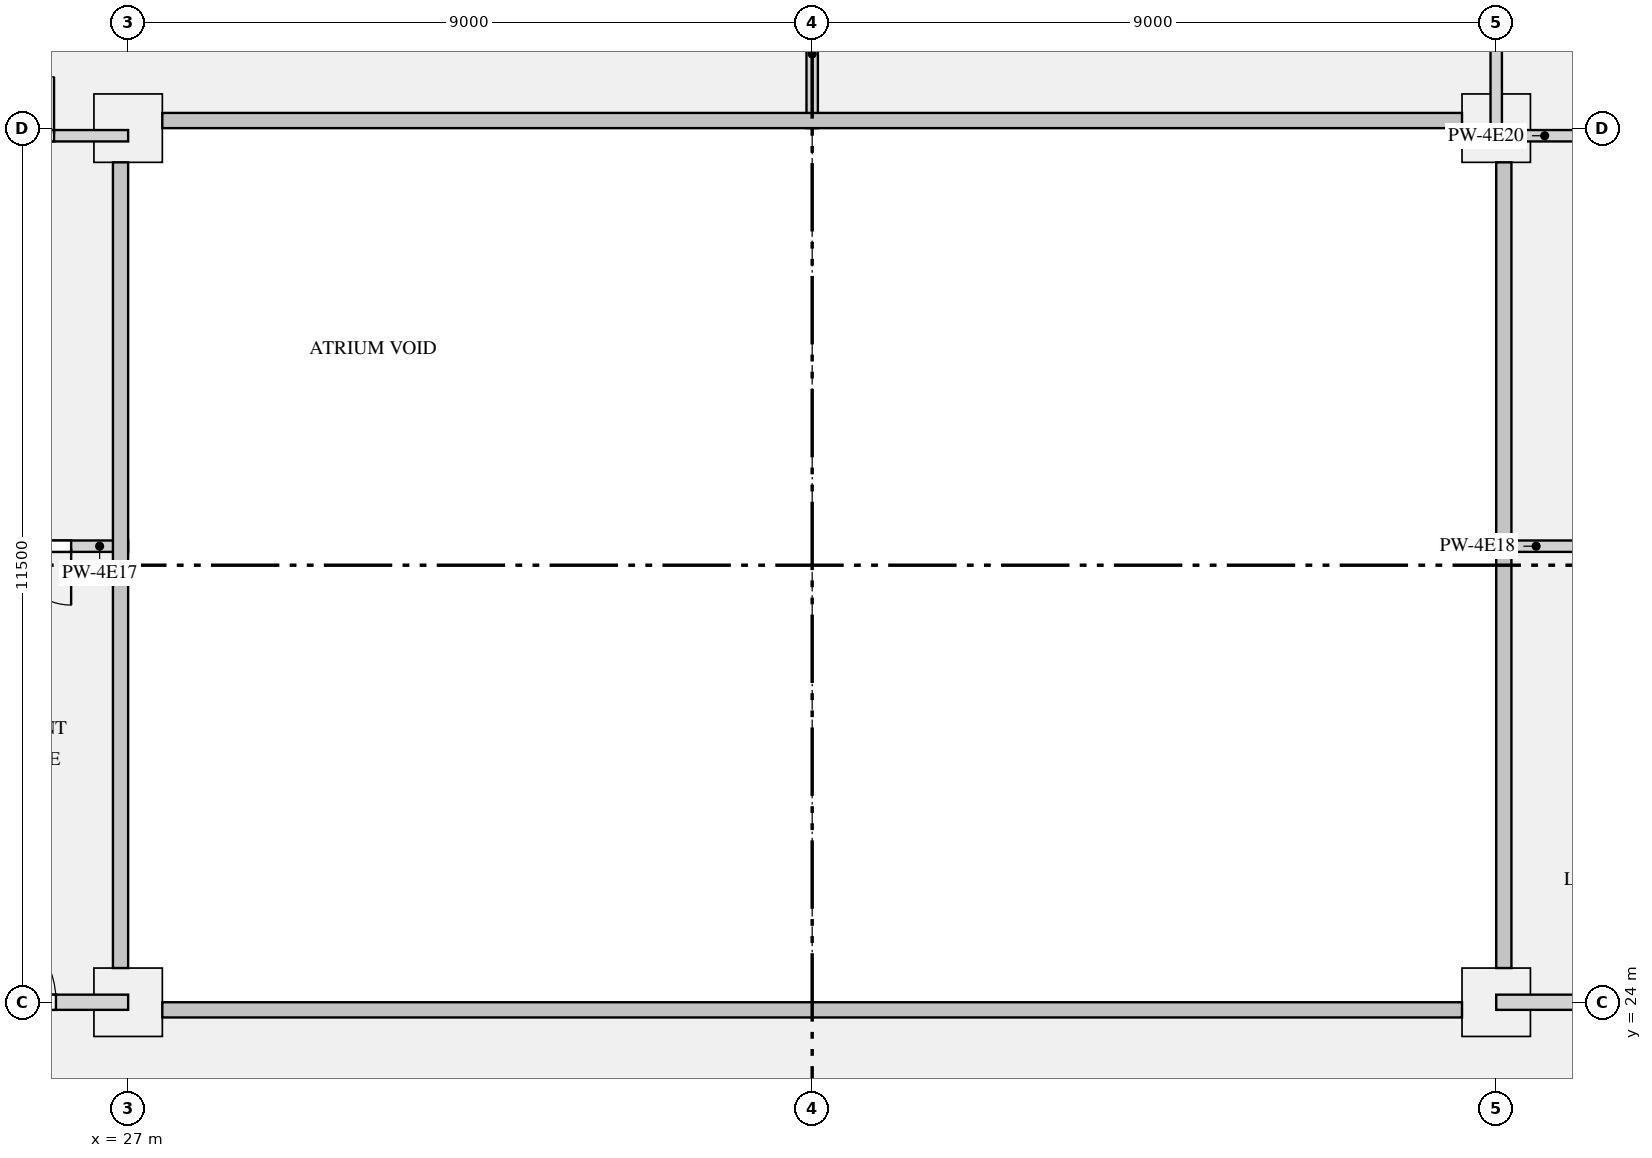
"""IFC4 building model, lengths in metres.
Left out: names, types, materials, properties, quantities, classifications, styles, units other than length and angle.
Written with IfcOpenShell. Run it as: python <this file> out.ifc"""

import sys

from ifc_helpers import new_model, si_unit, direction, frame, frame_2d, origin, origin_2d, place, context, subcontext, project, spatial, rectangle, extrude, element, fill, save


model = new_model("IFC4")
c1 = context("Model", 3, precision=1e-05, world=origin(), true_north=direction((0.0, 1.0)))
c2 = subcontext(c1, "Body", "Model", "MODEL_VIEW")
j1 = project(units=[si_unit("LENGTHUNIT", "METRE"), si_unit("PLANEANGLEUNIT", "RADIAN")], contexts=[c1])
p1 = place(None, origin())
s1 = spatial("IfcSite", under=j1, at=p1, CompositionType="ELEMENT")
p2 = place(p1, origin())
s2 = spatial("IfcBuilding", under=s1, at=p2, CompositionType="ELEMENT")
p3 = place(p2, frame((0.0, 0.0, 229.5)))
s3 = spatial("IfcBuildingStorey", under=s2, at=p3, CompositionType="ELEMENT", Elevation=229.5)
for number, where, z_axis, x_axis in (
    (1, (27.0, 24.0, 0.0), (0.0, 0.0, 1.0), (1.0, 0.0, 0.0)),
    (2, (45.0, 24.0, 0.0), (0.0, 0.0, 1.0), (1.0, 0.0, 0.0)),
    (3, (27.0, 35.5, 0.0), (0.0, 0.0, 1.0), (1.0, 0.0, 0.0)),
    (4, (45.0, 35.5, 0.0), (0.0, 0.0, 1.0), (1.0, 0.0, 0.0)),
):
    element("IfcColumn", number, at=place(p3, frame(where, z_axis=z_axis, x_axis=x_axis)), inside=s3, PredefinedType="COLUMN", context=c2, shape_type="SweptSolid", body=[
        extrude(rectangle(XDim=0.9, YDim=0.9, at=origin_2d()), origin(), (0.0, 0.0, 1.0), 3.15),
    ])
p4 = place(p3, frame((23.9, 24.0, 0.0), z_axis=(0.0, 0.0, 1.0), x_axis=(1.0, 0.0, 0.0)))
e5 = element("IfcWall", 5, at=p4, inside=s3, PredefinedType="PARTITIONING", context=c2, shape_type="SweptSolid", body=[
    extrude(rectangle(XDim=3.1, YDim=0.2, at=frame_2d((1.55, 0.0))), origin(), (0.0, 0.0, 1.0), 2.83),
])
p5 = place(p4, frame((1.05, 0.0, 0.0)))
e6 = element("IfcOpeningElement", 6, at=p5, cuts=e5, PredefinedType="OPENING", context=c2, shape_type="SweptSolid", body=[
    extrude(rectangle(XDim=1.1, YDim=2.1, at=frame_2d((0.55, 1.05))), frame((0.0, 0.11, 0.0), z_axis=(0.0, -1.0, 0.0), x_axis=(1.0, 0.0, 0.0)), (0.0, 0.0, 1.0), 0.22),
])
p6 = place(p3, frame((45.0, 24.0, 0.0), z_axis=(0.0, 0.0, 1.0), x_axis=(1.0, 0.0, 0.0)))
e7 = element("IfcWall", 7, at=p6, inside=s3, PredefinedType="PARTITIONING", context=c2, shape_type="SweptSolid", body=[
    extrude(rectangle(XDim=3.1, YDim=0.2, at=frame_2d((1.55, 0.0))), origin(), (0.0, 0.0, 1.0), 2.83),
])
p7 = place(p3, frame((24.075, 30.0, 0.0), z_axis=(0.0, 0.0, 1.0), x_axis=(1.0, 0.0, 0.0)))
e8 = element("IfcWall", 8, at=p7, inside=s3, PredefinedType="PARTITIONING", context=c2, shape_type="SweptSolid", body=[
    extrude(rectangle(XDim=2.925, YDim=0.15, at=frame_2d((1.462, 0.0))), origin(), (0.0, 0.0, 1.0), 2.83),
])
p8 = place(p7, frame((0.675, 0.0, 0.0)))
e9 = element("IfcOpeningElement", 9, at=p8, cuts=e8, PredefinedType="OPENING", context=c2, shape_type="SweptSolid", body=[
    extrude(rectangle(XDim=1.5, YDim=2.1, at=frame_2d((0.75, 1.05))), frame((0.0, 0.085, 0.0), z_axis=(0.0, -1.0, 0.0), x_axis=(1.0, 0.0, 0.0)), (0.0, 0.0, 1.0), 0.17),
])
p9 = place(p3, frame((45.0, 30.0, 0.0), z_axis=(0.0, 0.0, 1.0), x_axis=(1.0, 0.0, 0.0)))
e10 = element("IfcWall", 10, at=p9, inside=s3, PredefinedType="PARTITIONING", context=c2, shape_type="SweptSolid", body=[
    extrude(rectangle(XDim=2.9, YDim=0.15, at=frame_2d((1.45, 0.0))), origin(), (0.0, 0.0, 1.0), 2.83),
])
p10 = place(p9, frame((1.05, 0.0, 0.0)))
e11 = element("IfcOpeningElement", 11, at=p10, cuts=e10, PredefinedType="OPENING", context=c2, shape_type="SweptSolid", body=[
    extrude(rectangle(XDim=0.9, YDim=2.1, at=frame_2d((0.45, 1.05))), frame((0.0, 0.085, 0.0), z_axis=(0.0, -1.0, 0.0), x_axis=(1.0, 0.0, 0.0)), (0.0, 0.0, 1.0), 0.17),
])
p11 = place(p3, frame((15.8, 35.4, 0.0), z_axis=(0.0, 0.0, 1.0), x_axis=(1.0, 0.0, 0.0)))
e12 = element("IfcWall", 12, at=p11, inside=s3, PredefinedType="PARTITIONING", context=c2, shape_type="SweptSolid", body=[
    extrude(rectangle(XDim=11.2, YDim=0.15, at=frame_2d((5.6, 0.0))), origin(), (0.0, 0.0, 1.0), 2.83),
])
p12 = place(p11, frame((8.725, 0.0, 0.0)))
e13 = element("IfcOpeningElement", 13, at=p12, cuts=e12, PredefinedType="OPENING", context=c2, shape_type="SweptSolid", body=[
    extrude(rectangle(XDim=1.5, YDim=2.1, at=frame_2d((0.75, 1.05))), frame((0.0, 0.085, 0.0), z_axis=(0.0, -1.0, 0.0), x_axis=(1.0, 0.0, 0.0)), (0.0, 0.0, 1.0), 0.17),
])
p13 = place(p11, frame((7.0, 0.0, 0.0)))
e14 = element("IfcOpeningElement", 14, at=p13, cuts=e12, PredefinedType="OPENING", context=c2, shape_type="SweptSolid", body=[
    extrude(rectangle(XDim=0.9, YDim=2.1, at=frame_2d((0.45, 1.05))), frame((0.0, 0.085, 0.0), z_axis=(0.0, -1.0, 0.0), x_axis=(1.0, 0.0, 0.0)), (0.0, 0.0, 1.0), 0.17),
])
p14 = place(p11, frame((3.225, 0.0, 0.0)))
e15 = element("IfcOpeningElement", 15, at=p14, cuts=e12, PredefinedType="OPENING", context=c2, shape_type="SweptSolid", body=[
    extrude(rectangle(XDim=0.9, YDim=2.1, at=frame_2d((0.45, 1.05))), frame((0.0, 0.085, 0.0), z_axis=(0.0, -1.0, 0.0), x_axis=(1.0, 0.0, 0.0)), (0.0, 0.0, 1.0), 0.17),
])
p15 = place(p3, frame((45.0, 35.4, 0.0), z_axis=(0.0, 0.0, 1.0), x_axis=(1.0, 0.0, 0.0)))
e16 = element("IfcWall", 16, at=p15, inside=s3, PredefinedType="PARTITIONING", context=c2, shape_type="SweptSolid", body=[
    extrude(rectangle(XDim=3.1, YDim=0.15, at=frame_2d((1.55, 0.0))), origin(), (0.0, 0.0, 1.0), 2.83),
])
p16 = place(p15, frame((1.275, 0.0, 0.0)))
e17 = element("IfcOpeningElement", 17, at=p16, cuts=e16, PredefinedType="OPENING", context=c2, shape_type="SweptSolid", body=[
    extrude(rectangle(XDim=0.9, YDim=2.1, at=frame_2d((0.45, 1.05))), frame((0.0, 0.085, 0.0), z_axis=(0.0, -1.0, 0.0), x_axis=(1.0, 0.0, 0.0)), (0.0, 0.0, 1.0), 0.17),
])
p17 = place(p3, frame((36.0, 35.5, 0.0), z_axis=(0.0, 0.0, 1.0), x_axis=(0.0, 1.0, 0.0)))
e18 = element("IfcWall", 18, at=p17, inside=s3, PredefinedType="PARTITIONING", context=c2, shape_type="SweptSolid", body=[
    extrude(rectangle(XDim=5.35, YDim=0.15, at=frame_2d((2.675, 0.0))), origin(), (0.0, 0.0, 1.0), 2.83),
])
p18 = place(p17, frame((1.95, 0.0, 0.0)))
e19 = element("IfcOpeningElement", 19, at=p18, cuts=e18, PredefinedType="OPENING", context=c2, shape_type="SweptSolid", body=[
    extrude(rectangle(XDim=1.5, YDim=2.1, at=frame_2d((0.75, 1.05))), frame((0.0, 0.085, 0.0), z_axis=(0.0, -1.0, 0.0), x_axis=(1.0, 0.0, 0.0)), (0.0, 0.0, 1.0), 0.17),
])
p19 = place(p3, frame((45.0, 35.5, 0.0), z_axis=(0.0, 0.0, 1.0), x_axis=(0.0, 1.0, 0.0)))
e20 = element("IfcWall", 20, at=p19, inside=s3, PredefinedType="PARTITIONING", context=c2, shape_type="SweptSolid", body=[
    extrude(rectangle(XDim=5.35, YDim=0.15, at=frame_2d((2.675, 0.0))), origin(), (0.0, 0.0, 1.0), 2.83),
])
p20 = place(p19, frame((2.525, 0.0, 0.0)))
e21 = element("IfcOpeningElement", 21, at=p20, cuts=e20, PredefinedType="OPENING", context=c2, shape_type="SweptSolid", body=[
    extrude(rectangle(XDim=0.9, YDim=2.1, at=frame_2d((0.45, 1.05))), frame((0.0, 0.085, 0.0), z_axis=(0.0, -1.0, 0.0), x_axis=(1.0, 0.0, 0.0)), (0.0, 0.0, 1.0), 0.17),
])
p21 = place(p5, origin())
e22 = element("IfcDoor", 22, at=p21, inside=s3, OperationType="SINGLE_SWING_LEFT", PredefinedType="DOOR", context=c2, shape_type="SweptSolid", body=[
    extrude(rectangle(XDim=1.1, YDim=2.1, at=frame_2d((0.55, 1.05))), frame((0.0, 0.025, 0.0), z_axis=(0.0, -1.0, 0.0), x_axis=(1.0, 0.0, 0.0)), (0.0, 0.0, 1.0), 0.05),
])
fill(e6, e22)
p22 = place(p8, frame((1.5, 0.0, 0.0), z_axis=(0.0, 0.0, 1.0), x_axis=(-1.0, 0.0, 0.0)))
e23 = element("IfcDoor", 23, at=p22, inside=s3, OperationType="DOUBLE_DOOR_SINGLE_SWING", PredefinedType="DOOR", context=c2, shape_type="SweptSolid", body=[
    extrude(rectangle(XDim=1.5, YDim=2.1, at=frame_2d((0.75, 1.05))), frame((0.0, 0.025, 0.0), z_axis=(0.0, -1.0, 0.0), x_axis=(1.0, 0.0, 0.0)), (0.0, 0.0, 1.0), 0.05),
])
fill(e9, e23)
p23 = place(p12, origin())
e24 = element("IfcDoor", 24, at=p23, inside=s3, OperationType="DOUBLE_DOOR_SINGLE_SWING", PredefinedType="DOOR", context=c2, shape_type="SweptSolid", body=[
    extrude(rectangle(XDim=1.5, YDim=2.1, at=frame_2d((0.75, 1.05))), frame((0.0, 0.025, 0.0), z_axis=(0.0, -1.0, 0.0), x_axis=(1.0, 0.0, 0.0)), (0.0, 0.0, 1.0), 0.05),
])
fill(e13, e24)
save(model, sys.argv[1])
